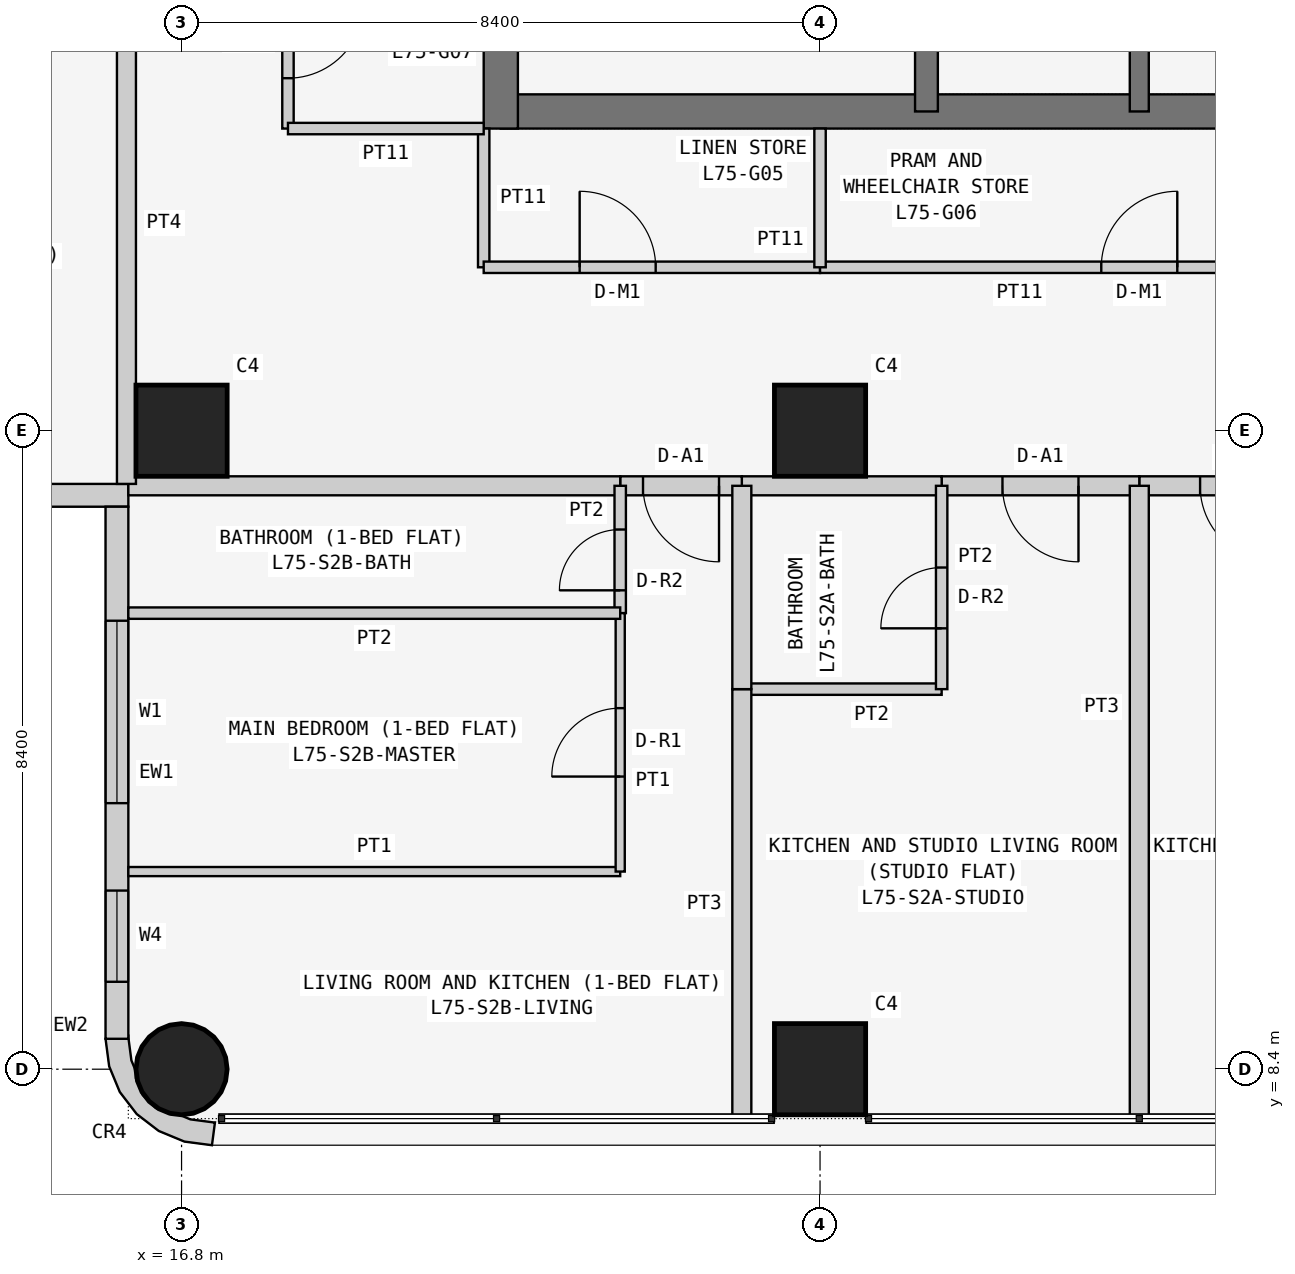
"""IFC4 building model, lengths in metres.
Left out: names, types, materials, properties, quantities, classifications, styles, units other than length and angle.
Written with IfcOpenShell. Run it as: python <this file> out.ifc"""

import sys

from ifc_helpers import new_model, si_unit, direction, frame, frame_2d, origin, origin_2d, place, context, subcontext, project, spatial, polyline, rectangle, circle, outline, extrude, element, fill, save


model = new_model("IFC4")
c1 = context("Model", 3, precision=1e-05, world=origin(), true_north=direction((0.0, 1.0)))
c2 = subcontext(c1, "Body", "Model", "MODEL_VIEW")
j1 = project(units=[si_unit("LENGTHUNIT", "METRE"), si_unit("PLANEANGLEUNIT", "RADIAN")], contexts=[c1])
p1 = place(None, origin())
s1 = spatial("IfcSite", under=j1, at=p1, CompositionType="ELEMENT")
p2 = place(p1, origin())
s2 = spatial("IfcBuilding", under=s1, at=p2, CompositionType="ELEMENT")
p3 = place(p2, frame((0.0, 0.0, 286.5)))
s3 = spatial("IfcBuildingStorey", under=s2, at=p3, CompositionType="ELEMENT", Elevation=286.5)
p4 = place(p3, frame((16.8, 8.4, 0.0), z_axis=(0.0, 0.0, 1.0), x_axis=(1.0, 0.0, 0.0)))
e1 = element("IfcColumn", 1, at=p4, inside=s3, PredefinedType="COLUMN", context=c2, shape_type="SweptSolid", body=[
    extrude(circle(Radius=0.6, at=origin_2d()), origin(), (0.0, 0.0, 1.0), 3.6),
])
for number, where, z_axis, x_axis in (
    (2, (16.8, 16.8, 0.0), (0.0, 0.0, 1.0), (1.0, 0.0, 0.0)),
    (3, (25.2, 8.4, 0.0), (0.0, 0.0, 1.0), (1.0, 0.0, 0.0)),
    (4, (25.2, 16.8, 0.0), (0.0, 0.0, 1.0), (1.0, 0.0, 0.0)),
):
    element("IfcColumn", number, at=place(p3, frame(where, z_axis=z_axis, x_axis=x_axis)), inside=s3, PredefinedType="COLUMN", context=c2, shape_type="SweptSolid", body=[
        extrude(rectangle(XDim=1.2, YDim=1.2, at=origin_2d()), origin(), (0.0, 0.0, 1.0), 3.6),
    ])
p5 = place(p3, frame((21.0, 21.0, 0.0), z_axis=(0.0, 0.0, 1.0), x_axis=(1.0, 0.0, 0.0)))
e5 = element("IfcWall", 5, at=p5, inside=s3, PredefinedType="SHEAR", context=c2, shape_type="SweptSolid", body=[
    extrude(rectangle(XDim=17.025, YDim=0.45, at=frame_2d((8.512, 0.0))), origin(), (0.0, 0.0, 1.0), 3.6),
])
p6 = place(p3, frame((21.0, 37.8, 0.0), z_axis=(0.0, 0.0, 1.0), x_axis=(0.0, -1.0, 0.0)))
e6 = element("IfcWall", 6, at=p6, inside=s3, PredefinedType="SHEAR", context=c2, shape_type="SweptSolid", body=[
    extrude(rectangle(XDim=17.025, YDim=0.45, at=frame_2d((8.513, 0.0))), origin(), (0.0, 0.0, 1.0), 3.6),
])
p7 = place(p6, frame((5.4, 0.0, 0.0)))
e7 = element("IfcOpeningElement", 7, at=p7, cuts=e6, PredefinedType="OPENING", context=c2, shape_type="SweptSolid", body=[
    extrude(rectangle(XDim=1.2, YDim=2.1, at=frame_2d((0.6, 1.05))), frame((0.0, 0.235, 0.0), z_axis=(0.0, -1.0, 0.0), x_axis=(1.0, 0.0, 0.0)), (0.0, 0.0, 1.0), 0.47),
])
p8 = place(p3, frame((26.6, 21.0, 0.0), z_axis=(0.0, 0.0, 1.0), x_axis=(0.0, 1.0, 0.0)))
e8 = element("IfcWall", 8, at=p8, inside=s3, PredefinedType="SHEAR", context=c2, shape_type="SweptSolid", body=[
    extrude(rectangle(XDim=16.8, YDim=0.3, at=frame_2d((8.4, 0.0))), origin(), (0.0, 0.0, 1.0), 3.6),
])
p9 = place(p8, frame((10.4, 0.0, 0.0)))
e9 = element("IfcOpeningElement", 9, at=p9, cuts=e8, PredefinedType="OPENING", context=c2, shape_type="SweptSolid", body=[
    extrude(rectangle(XDim=1.2, YDim=2.1, at=frame_2d((0.6, 1.05))), frame((0.0, 0.16, 0.0), z_axis=(0.0, -1.0, 0.0), x_axis=(1.0, 0.0, 0.0)), (0.0, 0.0, 1.0), 0.32),
])
p10 = place(p3, frame((29.4, 21.0, 0.0), z_axis=(0.0, 0.0, 1.0), x_axis=(0.0, 1.0, 0.0)))
e10 = element("IfcWall", 10, at=p10, inside=s3, PredefinedType="SHEAR", context=c2, shape_type="SweptSolid", body=[
    extrude(rectangle(XDim=3.2, YDim=0.25, at=frame_2d((1.6, 0.0))), origin(), (0.0, 0.0, 1.0), 3.6),
])
p11 = place(p3, frame((8.8, 15.95, 0.0), z_axis=(0.0, 0.0, 1.0), x_axis=(1.0, 0.0, 0.0)))
e11 = element("IfcWall", 11, at=p11, inside=s3, PredefinedType="SOLIDWALL", context=c2, shape_type="SweptSolid", body=[
    extrude(rectangle(XDim=7.3, YDim=0.3, at=frame_2d((3.65, 0.0))), origin(), (0.0, 0.0, 1.0), 3.45),
])
p12 = place(p11, frame((3.1, 0.0, 0.9)))
e12 = element("IfcOpeningElement", 12, at=p12, cuts=e11, PredefinedType="OPENING", context=c2, shape_type="SweptSolid", body=[
    extrude(rectangle(XDim=2.4, YDim=1.5, at=frame_2d((1.2, 0.75))), frame((0.0, 0.16, 0.0), z_axis=(0.0, -1.0, 0.0), x_axis=(1.0, 0.0, 0.0)), (0.0, 0.0, 1.0), 0.32),
])
p13 = place(p11, frame((0.75, 0.0, 0.9)))
e13 = element("IfcOpeningElement", 13, at=p13, cuts=e11, PredefinedType="OPENING", context=c2, shape_type="SweptSolid", body=[
    extrude(rectangle(XDim=1.2, YDim=1.5, at=frame_2d((0.6, 0.75))), frame((0.0, 0.16, 0.0), z_axis=(0.0, -1.0, 0.0), x_axis=(1.0, 0.0, 0.0)), (0.0, 0.0, 1.0), 0.32),
])
p14 = place(p3, frame((15.95, 15.8, 0.0), z_axis=(0.0, 0.0, 1.0), x_axis=(0.0, -1.0, 0.0)))
e14 = element("IfcWall", 14, at=p14, inside=s3, PredefinedType="SOLIDWALL", context=c2, shape_type="SweptSolid", body=[
    extrude(rectangle(XDim=7.0, YDim=0.3, at=frame_2d((3.5, 0.0))), origin(), (0.0, 0.0, 1.0), 3.45),
])
p15 = place(p14, frame((1.5, 0.0, 0.9)))
e15 = element("IfcOpeningElement", 15, at=p15, cuts=e14, PredefinedType="OPENING", context=c2, shape_type="SweptSolid", body=[
    extrude(rectangle(XDim=2.4, YDim=1.5, at=frame_2d((1.2, 0.75))), frame((0.0, 0.16, 0.0), z_axis=(0.0, -1.0, 0.0), x_axis=(1.0, 0.0, 0.0)), (0.0, 0.0, 1.0), 0.32),
])
p16 = place(p14, frame((5.05, 0.0, 0.9)))
e16 = element("IfcOpeningElement", 16, at=p16, cuts=e14, PredefinedType="OPENING", context=c2, shape_type="SweptSolid", body=[
    extrude(rectangle(XDim=1.2, YDim=1.5, at=frame_2d((0.6, 0.75))), frame((0.0, 0.16, 0.0), z_axis=(0.0, -1.0, 0.0), x_axis=(1.0, 0.0, 0.0)), (0.0, 0.0, 1.0), 0.32),
])
p17 = place(p3, frame((16.224, 8.762, 0.0), z_axis=(0.0, 0.0, 1.0), x_axis=(-0.707106781187, -0.707106781187, 0.0)))
e17 = element("IfcWall", 17, at=p17, inside=s3, PredefinedType="SOLIDWALL", context=c2, shape_type="SweptSolid", body=[
    extrude(outline(polyline([(0.033, 1.469), (0.047, 1.455), (0.233, 1.212), (0.292, 1.069), (0.358, 1.003), (0.449, 0.783), (0.449, 0.543), (0.358, 0.322), (0.292, 0.257), (0.233, 0.114), (0.047, -0.129), (0.033, -0.143), (0.273, -0.327), (0.495, -0.037), (0.635, 0.3), (0.683, 0.663), (0.635, 1.025), (0.495, 1.363), (0.273, 1.653), (0.033, 1.469)])), origin(), (0.0, 0.0, 1.0), 3.45),
])
p18 = place(p3, frame((20.775, 20.775, 0.0), z_axis=(0.0, 0.0, 1.0), x_axis=(0.0, -1.0, 0.0)))
e18 = element("IfcWall", 18, at=p18, inside=s3, PredefinedType="PARTITIONING", context=c2, shape_type="SweptSolid", body=[
    extrude(rectangle(XDim=1.825, YDim=0.15, at=frame_2d((0.913, 0.0))), origin(), (0.0, 0.0, 1.0), 3.45),
])
p19 = place(p3, frame((20.775, 18.95, 0.0), z_axis=(0.0, 0.0, 1.0), x_axis=(1.0, 0.0, 0.0)))
e19 = element("IfcWall", 19, at=p19, inside=s3, PredefinedType="PARTITIONING", context=c2, shape_type="SweptSolid", body=[
    extrude(rectangle(XDim=4.425, YDim=0.15, at=frame_2d((2.212, 0.0))), origin(), (0.0, 0.0, 1.0), 3.45),
])
p20 = place(p19, frame((1.262, 0.0, 0.0)))
e20 = element("IfcOpeningElement", 20, at=p20, cuts=e19, PredefinedType="OPENING", context=c2, shape_type="SweptSolid", body=[
    extrude(rectangle(XDim=1.0, YDim=2.1, at=frame_2d((0.5, 1.05))), frame((0.0, 0.085, 0.0), z_axis=(0.0, -1.0, 0.0), x_axis=(1.0, 0.0, 0.0)), (0.0, 0.0, 1.0), 0.17),
])
p21 = place(p3, frame((25.2, 18.95, 0.0), z_axis=(0.0, 0.0, 1.0), x_axis=(1.0, 0.0, 0.0)))
e21 = element("IfcWall", 21, at=p21, inside=s3, PredefinedType="PARTITIONING", context=c2, shape_type="SweptSolid", body=[
    extrude(rectangle(XDim=7.5, YDim=0.15, at=frame_2d((3.75, 0.0))), origin(), (0.0, 0.0, 1.0), 3.45),
])
p22 = place(p21, frame((3.7, 0.0, 0.0)))
e22 = element("IfcOpeningElement", 22, at=p22, cuts=e21, PredefinedType="OPENING", context=c2, shape_type="SweptSolid", body=[
    extrude(rectangle(XDim=1.0, YDim=2.1, at=frame_2d((0.5, 1.05))), frame((0.0, 0.085, 0.0), z_axis=(0.0, -1.0, 0.0), x_axis=(1.0, 0.0, 0.0)), (0.0, 0.0, 1.0), 0.17),
])
p23 = place(p3, frame((18.2, 23.1, 0.0), z_axis=(0.0, 0.0, 1.0), x_axis=(0.0, -1.0, 0.0)))
e23 = element("IfcWall", 23, at=p23, inside=s3, PredefinedType="PARTITIONING", context=c2, shape_type="SweptSolid", body=[
    extrude(rectangle(XDim=2.325, YDim=0.15, at=frame_2d((1.163, 0.0))), origin(), (0.0, 0.0, 1.0), 3.45),
])
p24 = place(p23, frame((0.663, 0.0, 0.0)))
e24 = element("IfcOpeningElement", 24, at=p24, cuts=e23, PredefinedType="OPENING", context=c2, shape_type="SweptSolid", body=[
    extrude(rectangle(XDim=1.0, YDim=2.1, at=frame_2d((0.5, 1.05))), frame((0.0, 0.085, 0.0), z_axis=(0.0, -1.0, 0.0), x_axis=(1.0, 0.0, 0.0)), (0.0, 0.0, 1.0), 0.17),
])
p25 = place(p3, frame((18.2, 20.775, 0.0), z_axis=(0.0, 0.0, 1.0), x_axis=(1.0, 0.0, 0.0)))
e25 = element("IfcWall", 25, at=p25, inside=s3, PredefinedType="PARTITIONING", context=c2, shape_type="SweptSolid", body=[
    extrude(rectangle(XDim=2.575, YDim=0.15, at=frame_2d((1.288, 0.0))), origin(), (0.0, 0.0, 1.0), 3.45),
])
p26 = place(p3, frame((32.0, 16.075, 0.0), z_axis=(0.0, 0.0, 1.0), x_axis=(-1.0, 0.0, 0.0)))
e26 = element("IfcWall", 26, at=p26, inside=s3, PredefinedType="PARTITIONING", context=c2, shape_type="SweptSolid", body=[
    extrude(rectangle(XDim=2.6, YDim=0.25, at=frame_2d((1.3, 0.0))), origin(), (0.0, 0.0, 1.0), 3.45),
])
p27 = place(p26, frame((0.8, 0.0, 0.0)))
e27 = element("IfcOpeningElement", 27, at=p27, cuts=e26, PredefinedType="OPENING", context=c2, shape_type="SweptSolid", body=[
    extrude(rectangle(XDim=1.0, YDim=2.1, at=frame_2d((0.5, 1.05))), frame((0.0, 0.135, 0.0), z_axis=(0.0, -1.0, 0.0), x_axis=(1.0, 0.0, 0.0)), (0.0, 0.0, 1.0), 0.27),
])
p28 = place(p3, frame((29.4, 16.075, 0.0), z_axis=(0.0, 0.0, 1.0), x_axis=(-1.0, 0.0, 0.0)))
e28 = element("IfcWall", 28, at=p28, inside=s3, PredefinedType="PARTITIONING", context=c2, shape_type="SweptSolid", body=[
    extrude(rectangle(XDim=2.6, YDim=0.25, at=frame_2d((1.3, 0.0))), origin(), (0.0, 0.0, 1.0), 3.45),
])
p29 = place(p28, frame((0.8, 0.0, 0.0)))
e29 = element("IfcOpeningElement", 29, at=p29, cuts=e28, PredefinedType="OPENING", context=c2, shape_type="SweptSolid", body=[
    extrude(rectangle(XDim=1.0, YDim=2.1, at=frame_2d((0.5, 1.05))), frame((0.0, 0.135, 0.0), z_axis=(0.0, -1.0, 0.0), x_axis=(1.0, 0.0, 0.0)), (0.0, 0.0, 1.0), 0.27),
])
p30 = place(p3, frame((26.8, 16.075, 0.0), z_axis=(0.0, 0.0, 1.0), x_axis=(-1.0, 0.0, 0.0)))
e30 = element("IfcWall", 30, at=p30, inside=s3, PredefinedType="PARTITIONING", context=c2, shape_type="SweptSolid", body=[
    extrude(rectangle(XDim=2.629, YDim=0.25, at=frame_2d((1.314, 0.0))), origin(), (0.0, 0.0, 1.0), 3.45),
])
p31 = place(p3, frame((24.171, 16.075, 0.0), z_axis=(0.0, 0.0, 1.0), x_axis=(-1.0, 0.0, 0.0)))
e31 = element("IfcWall", 31, at=p31, inside=s3, PredefinedType="PARTITIONING", context=c2, shape_type="SweptSolid", body=[
    extrude(rectangle(XDim=1.6, YDim=0.25, at=frame_2d((0.8, 0.0))), origin(), (0.0, 0.0, 1.0), 3.45),
])
p32 = place(p31, frame((0.3, 0.0, 0.0)))
e32 = element("IfcOpeningElement", 32, at=p32, cuts=e31, PredefinedType="OPENING", context=c2, shape_type="SweptSolid", body=[
    extrude(rectangle(XDim=1.0, YDim=2.1, at=frame_2d((0.5, 1.05))), frame((0.0, 0.135, 0.0), z_axis=(0.0, -1.0, 0.0), x_axis=(1.0, 0.0, 0.0)), (0.0, 0.0, 1.0), 0.27),
])
p33 = place(p3, frame((22.571, 16.075, 0.0), z_axis=(0.0, 0.0, 1.0), x_axis=(-1.0, 0.0, 0.0)))
e33 = element("IfcWall", 33, at=p33, inside=s3, PredefinedType="PARTITIONING", context=c2, shape_type="SweptSolid", body=[
    extrude(rectangle(XDim=6.471, YDim=0.25, at=frame_2d((3.235, 0.0))), origin(), (0.0, 0.0, 1.0), 3.45),
])
p34 = place(p3, frame((16.075, 16.1, 0.0), z_axis=(0.0, 0.0, 1.0), x_axis=(0.0, 1.0, 0.0)))
e34 = element("IfcWall", 34, at=p34, inside=s3, PredefinedType="PARTITIONING", context=c2, shape_type="SweptSolid", body=[
    extrude(rectangle(XDim=6.871, YDim=0.25, at=frame_2d((3.436, 0.0))), origin(), (0.0, 0.0, 1.0), 3.45),
])
p35 = place(p3, frame((25.2, 18.95, 0.0), z_axis=(0.0, 0.0, 1.0), x_axis=(0.0, 1.0, 0.0)))
e35 = element("IfcWall", 35, at=p35, inside=s3, PredefinedType="PARTITIONING", context=c2, shape_type="SweptSolid", body=[
    extrude(rectangle(XDim=1.825, YDim=0.15, at=frame_2d((0.913, 0.0))), origin(), (0.0, 0.0, 1.0), 2.767),
])
p36 = place(p3, frame((29.4, 7.75, 0.0), z_axis=(0.0, 0.0, 1.0), x_axis=(0.0, 1.0, 0.0)))
e36 = element("IfcWall", 36, at=p36, inside=s3, PredefinedType="PARTITIONING", context=c2, shape_type="SweptSolid", body=[
    extrude(rectangle(XDim=8.325, YDim=0.25, at=frame_2d((4.163, 0.0))), origin(), (0.0, 0.0, 1.0), 2.848),
])
p37 = place(p3, frame((24.171, 13.4, 0.0), z_axis=(0.0, 0.0, 1.0), x_axis=(1.0, 0.0, 0.0)))
e37 = element("IfcWall", 37, at=p37, inside=s3, PredefinedType="PARTITIONING", context=c2, shape_type="SweptSolid", body=[
    extrude(rectangle(XDim=2.629, YDim=0.15, at=frame_2d((1.314, 0.0))), origin(), (0.0, 0.0, 1.0), 3.45),
])
p38 = place(p3, frame((26.8, 13.4, 0.0), z_axis=(0.0, 0.0, 1.0), x_axis=(0.0, 1.0, 0.0)))
e38 = element("IfcWall", 38, at=p38, inside=s3, PredefinedType="PARTITIONING", context=c2, shape_type="SweptSolid", body=[
    extrude(rectangle(XDim=2.675, YDim=0.15, at=frame_2d((1.337, 0.0))), origin(), (0.0, 0.0, 1.0), 3.45),
])
p39 = place(p38, frame((0.8, 0.0, 0.0)))
e39 = element("IfcOpeningElement", 39, at=p39, cuts=e38, PredefinedType="OPENING", context=c2, shape_type="SweptSolid", body=[
    extrude(rectangle(XDim=0.8, YDim=2.1, at=frame_2d((0.4, 1.05))), frame((0.0, 0.085, 0.0), z_axis=(0.0, -1.0, 0.0), x_axis=(1.0, 0.0, 0.0)), (0.0, 0.0, 1.0), 0.17),
])
p40 = place(p3, frame((24.171, 7.75, 0.0), z_axis=(0.0, 0.0, 1.0), x_axis=(0.0, 1.0, 0.0)))
e40 = element("IfcWall", 40, at=p40, inside=s3, PredefinedType="PARTITIONING", context=c2, shape_type="SweptSolid", body=[
    extrude(rectangle(XDim=5.65, YDim=0.25, at=frame_2d((2.825, 0.0))), origin(), (0.0, 0.0, 1.0), 3.45),
])
p41 = place(p3, frame((24.171, 13.4, 0.0), z_axis=(0.0, 0.0, 1.0), x_axis=(0.0, 1.0, 0.0)))
e41 = element("IfcWall", 41, at=p41, inside=s3, PredefinedType="PARTITIONING", context=c2, shape_type="SweptSolid", body=[
    extrude(rectangle(XDim=2.675, YDim=0.25, at=frame_2d((1.337, 0.0))), origin(), (0.0, 0.0, 1.0), 3.45),
])
p42 = place(p3, frame((22.571, 14.4, 0.0), z_axis=(0.0, 0.0, 1.0), x_axis=(0.0, 1.0, 0.0)))
e42 = element("IfcWall", 42, at=p42, inside=s3, PredefinedType="PARTITIONING", context=c2, shape_type="SweptSolid", body=[
    extrude(rectangle(XDim=1.675, YDim=0.15, at=frame_2d((0.837, 0.0))), origin(), (0.0, 0.0, 1.0), 3.45),
])
p43 = place(p42, frame((0.3, 0.0, 0.0)))
e43 = element("IfcOpeningElement", 43, at=p43, cuts=e42, PredefinedType="OPENING", context=c2, shape_type="SweptSolid", body=[
    extrude(rectangle(XDim=0.8, YDim=2.1, at=frame_2d((0.4, 1.05))), frame((0.0, 0.085, 0.0), z_axis=(0.0, -1.0, 0.0), x_axis=(1.0, 0.0, 0.0)), (0.0, 0.0, 1.0), 0.17),
])
p44 = place(p3, frame((16.1, 11.0, 0.0), z_axis=(0.0, 0.0, 1.0), x_axis=(1.0, 0.0, 0.0)))
e44 = element("IfcWall", 44, at=p44, inside=s3, PredefinedType="PARTITIONING", context=c2, shape_type="SweptSolid", body=[
    extrude(rectangle(XDim=6.471, YDim=0.12, at=frame_2d((3.235, 0.0))), origin(), (0.0, 0.0, 1.0), 3.45),
])
p45 = place(p3, frame((22.571, 11.0, 0.0), z_axis=(0.0, 0.0, 1.0), x_axis=(0.0, 1.0, 0.0)))
e45 = element("IfcWall", 45, at=p45, inside=s3, PredefinedType="PARTITIONING", context=c2, shape_type="SweptSolid", body=[
    extrude(rectangle(XDim=3.4, YDim=0.12, at=frame_2d((1.7, 0.0))), origin(), (0.0, 0.0, 1.0), 3.45),
])
p46 = place(p45, frame((1.25, 0.0, 0.0)))
e46 = element("IfcOpeningElement", 46, at=p46, cuts=e45, PredefinedType="OPENING", context=c2, shape_type="SweptSolid", body=[
    extrude(rectangle(XDim=0.9, YDim=2.1, at=frame_2d((0.45, 1.05))), frame((0.0, 0.07, 0.0), z_axis=(0.0, -1.0, 0.0), x_axis=(1.0, 0.0, 0.0)), (0.0, 0.0, 1.0), 0.14),
])
p47 = place(p3, frame((22.571, 14.4, 0.0), z_axis=(0.0, 0.0, 1.0), x_axis=(-1.0, 0.0, 0.0)))
e47 = element("IfcWall", 47, at=p47, inside=s3, PredefinedType="PARTITIONING", context=c2, shape_type="SweptSolid", body=[
    extrude(rectangle(XDim=6.471, YDim=0.15, at=frame_2d((3.235, 0.0))), origin(), (0.0, 0.0, 1.0), 3.45),
])
p48 = place(p15, origin())
e48 = element("IfcWindow", 48, at=p48, inside=s3, PartitioningType="SINGLE_PANEL", PredefinedType="WINDOW", context=c2, shape_type="SweptSolid", body=[
    extrude(rectangle(XDim=2.4, YDim=1.5, at=frame_2d((1.2, 0.75))), frame((0.0, 0.03, 0.0), z_axis=(0.0, -1.0, 0.0), x_axis=(1.0, 0.0, 0.0)), (0.0, 0.0, 1.0), 0.06),
])
fill(e15, e48)
p49 = place(p16, origin())
e49 = element("IfcWindow", 49, at=p49, inside=s3, PartitioningType="SINGLE_PANEL", PredefinedType="WINDOW", context=c2, shape_type="SweptSolid", body=[
    extrude(rectangle(XDim=1.2, YDim=1.5, at=frame_2d((0.6, 0.75))), frame((0.0, 0.03, 0.0), z_axis=(0.0, -1.0, 0.0), x_axis=(1.0, 0.0, 0.0)), (0.0, 0.0, 1.0), 0.06),
])
fill(e16, e49)
p50 = place(p20, origin())
e50 = element("IfcDoor", 50, at=p50, inside=s3, OperationType="SINGLE_SWING_LEFT", PredefinedType="DOOR", context=c2, shape_type="SweptSolid", body=[
    extrude(rectangle(XDim=1.0, YDim=2.1, at=frame_2d((0.5, 1.05))), frame((0.0, 0.025, 0.0), z_axis=(0.0, -1.0, 0.0), x_axis=(1.0, 0.0, 0.0)), (0.0, 0.0, 1.0), 0.05),
])
fill(e20, e50)
p51 = place(p22, origin())
e51 = element("IfcDoor", 51, at=p51, inside=s3, OperationType="SINGLE_SWING_RIGHT", PredefinedType="DOOR", context=c2, shape_type="SweptSolid", body=[
    extrude(rectangle(XDim=1.0, YDim=2.1, at=frame_2d((0.5, 1.05))), frame((0.0, 0.025, 0.0), z_axis=(0.0, -1.0, 0.0), x_axis=(1.0, 0.0, 0.0)), (0.0, 0.0, 1.0), 0.05),
])
fill(e22, e51)
p52 = place(p24, origin())
e52 = element("IfcDoor", 52, at=p52, inside=s3, OperationType="SINGLE_SWING_LEFT", PredefinedType="DOOR", context=c2, shape_type="SweptSolid", body=[
    extrude(rectangle(XDim=1.0, YDim=2.1, at=frame_2d((0.5, 1.05))), frame((0.0, 0.025, 0.0), z_axis=(0.0, -1.0, 0.0), x_axis=(1.0, 0.0, 0.0)), (0.0, 0.0, 1.0), 0.05),
])
fill(e24, e52)
p53 = place(p27, origin())
e53 = element("IfcDoor", 53, at=p53, inside=s3, OperationType="SINGLE_SWING_LEFT", PredefinedType="DOOR", context=c2, shape_type="SweptSolid", body=[
    extrude(rectangle(XDim=1.0, YDim=2.1, at=frame_2d((0.5, 1.05))), frame((0.0, 0.025, 0.0), z_axis=(0.0, -1.0, 0.0), x_axis=(1.0, 0.0, 0.0)), (0.0, 0.0, 1.0), 0.05),
])
fill(e27, e53)
p54 = place(p29, origin())
e54 = element("IfcDoor", 54, at=p54, inside=s3, OperationType="SINGLE_SWING_LEFT", PredefinedType="DOOR", context=c2, shape_type="SweptSolid", body=[
    extrude(rectangle(XDim=1.0, YDim=2.1, at=frame_2d((0.5, 1.05))), frame((0.0, 0.025, 0.0), z_axis=(0.0, -1.0, 0.0), x_axis=(1.0, 0.0, 0.0)), (0.0, 0.0, 1.0), 0.05),
])
fill(e29, e54)
p55 = place(p39, origin())
e55 = element("IfcDoor", 55, at=p55, inside=s3, OperationType="SINGLE_SWING_LEFT", PredefinedType="DOOR", context=c2, shape_type="SweptSolid", body=[
    extrude(rectangle(XDim=0.8, YDim=2.1, at=frame_2d((0.4, 1.05))), frame((0.0, 0.025, 0.0), z_axis=(0.0, -1.0, 0.0), x_axis=(1.0, 0.0, 0.0)), (0.0, 0.0, 1.0), 0.05),
])
fill(e39, e55)
p56 = place(p32, origin())
e56 = element("IfcDoor", 56, at=p56, inside=s3, OperationType="SINGLE_SWING_LEFT", PredefinedType="DOOR", context=c2, shape_type="SweptSolid", body=[
    extrude(rectangle(XDim=1.0, YDim=2.1, at=frame_2d((0.5, 1.05))), frame((0.0, 0.025, 0.0), z_axis=(0.0, -1.0, 0.0), x_axis=(1.0, 0.0, 0.0)), (0.0, 0.0, 1.0), 0.05),
])
fill(e32, e56)
p57 = place(p43, origin())
e57 = element("IfcDoor", 57, at=p57, inside=s3, OperationType="SINGLE_SWING_LEFT", PredefinedType="DOOR", context=c2, shape_type="SweptSolid", body=[
    extrude(rectangle(XDim=0.8, YDim=2.1, at=frame_2d((0.4, 1.05))), frame((0.0, 0.025, 0.0), z_axis=(0.0, -1.0, 0.0), x_axis=(1.0, 0.0, 0.0)), (0.0, 0.0, 1.0), 0.05),
])
fill(e43, e57)
p58 = place(p46, origin())
e58 = element("IfcDoor", 58, at=p58, inside=s3, OperationType="SINGLE_SWING_LEFT", PredefinedType="DOOR", context=c2, shape_type="SweptSolid", body=[
    extrude(rectangle(XDim=0.9, YDim=2.1, at=frame_2d((0.45, 1.05))), frame((0.0, 0.025, 0.0), z_axis=(0.0, -1.0, 0.0), x_axis=(1.0, 0.0, 0.0)), (0.0, 0.0, 1.0), 0.05),
])
fill(e46, e58)
save(model, sys.argv[1])
